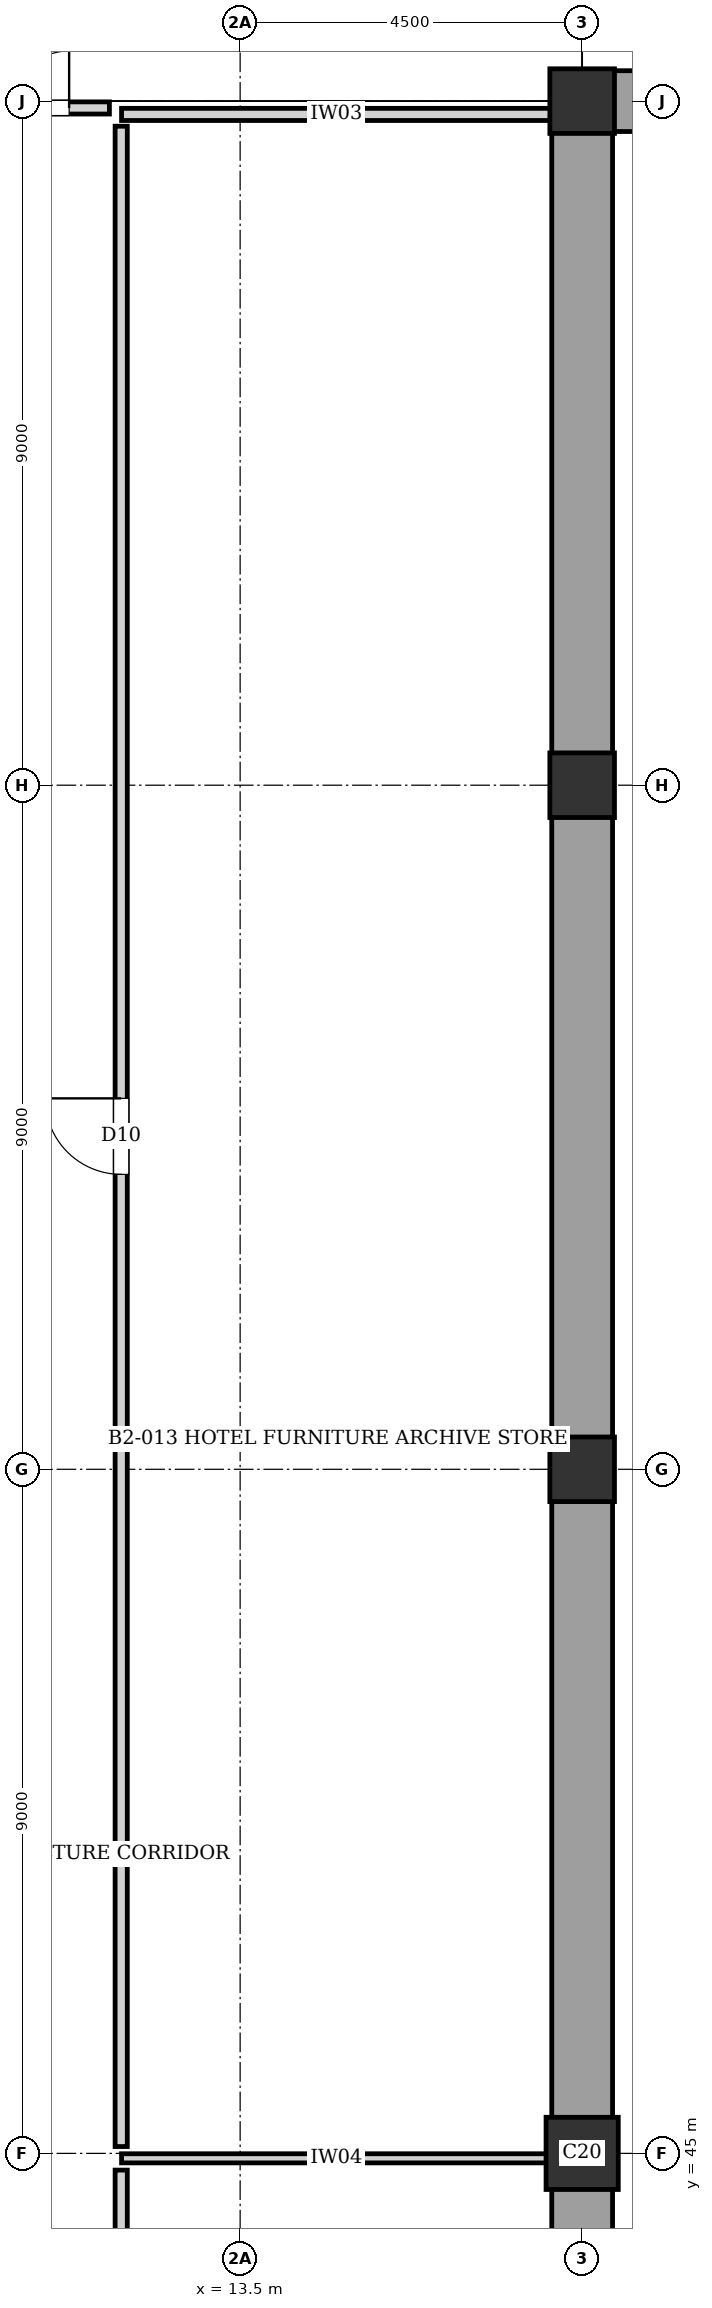
"""IFC4 building model, lengths in metres.
Left out: names, types, materials, properties, quantities, classifications, styles, units other than length and angle.
Written with IfcOpenShell. Run it as: python <this file> out.ifc"""

import sys

from ifc_helpers import new_model, si_unit, direction, frame, frame_2d, origin, origin_2d, place, context, subcontext, project, spatial, rectangle, extrude, element, fill, save


model = new_model("IFC4")
c1 = context("Model", 3, precision=1e-05, world=origin(), true_north=direction((0.0, 1.0)))
c2 = subcontext(c1, "Body", "Model", "MODEL_VIEW")
j1 = project(units=[si_unit("LENGTHUNIT", "METRE"), si_unit("PLANEANGLEUNIT", "RADIAN")], contexts=[c1])
p1 = place(None, origin())
s1 = spatial("IfcSite", under=j1, at=p1, CompositionType="ELEMENT")
p2 = place(p1, origin())
s2 = spatial("IfcBuilding", under=s1, at=p2, CompositionType="ELEMENT")
p3 = place(p2, frame((0.0, 0.0, -8.96)))
s3 = spatial("IfcBuildingStorey", under=s2, at=p3, CompositionType="ELEMENT", Elevation=-8.96)
p4 = place(p3, frame((18.0, 45.0, 0.0), z_axis=(0.0, 0.0, 1.0), x_axis=(1.0, 0.0, 0.0)))
e1 = element("IfcColumn", 1, at=p4, inside=s3, PredefinedType="COLUMN", context=c2, shape_type="SweptSolid", body=[
    extrude(rectangle(XDim=0.95, YDim=0.95, at=origin_2d()), origin(), (0.0, 0.0, 1.0), 4.48),
])
for number, where, z_axis, x_axis in (
    (2, (18.0, 54.0, 0.0), (0.0, 0.0, 1.0), (1.0, 0.0, 0.0)),
    (3, (18.0, 63.0, 0.0), (0.0, 0.0, 1.0), (1.0, 0.0, 0.0)),
    (4, (18.0, 72.0, 0.0), (0.0, 0.0, 1.0), (1.0, 0.0, 0.0)),
):
    element("IfcColumn", number, at=place(p3, frame(where, z_axis=z_axis, x_axis=x_axis)), inside=s3, PredefinedType="COLUMN", context=c2, shape_type="SweptSolid", body=[
        extrude(rectangle(XDim=0.85, YDim=0.85, at=origin_2d()), origin(), (0.0, 0.0, 1.0), 4.48),
    ])
for number, where, z_axis, x_axis in (
    (5, (18.0, 72.0, 0.0), (0.0, 0.0, 1.0), (0.0, -1.0, 0.0)),
    (6, (18.0, 63.0, 0.0), (0.0, 0.0, 1.0), (0.0, -1.0, 0.0)),
    (7, (18.0, 54.0, 0.0), (0.0, 0.0, 1.0), (0.0, -1.0, 0.0)),
    (8, (18.0, 45.0, 0.0), (0.0, 0.0, 1.0), (0.0, -1.0, 0.0)),
):
    element("IfcWall", number, at=place(p3, frame(where, z_axis=z_axis, x_axis=x_axis)), inside=s3, PredefinedType="USERDEFINED", context=c2, shape_type="SweptSolid", body=[
        extrude(rectangle(XDim=9.0, YDim=0.8, at=frame_2d((4.5, 0.0))), origin(), (0.0, 0.0, 1.0), 4.2),
    ])
p5 = place(p3, frame((27.0, 72.0, 0.0), z_axis=(0.0, 0.0, 1.0), x_axis=(-1.0, 0.0, 0.0)))
e9 = element("IfcWall", 9, at=p5, inside=s3, PredefinedType="USERDEFINED", context=c2, shape_type="SweptSolid", body=[
    extrude(rectangle(XDim=9.0, YDim=0.8, at=frame_2d((4.5, 0.0))), origin(), (0.0, 0.0, 1.0), 4.03),
])
p6 = place(p3, frame((11.94, 44.935, 0.0), z_axis=(0.0, 0.0, 1.0), x_axis=(1.0, 0.0, 0.0)))
e10 = element("IfcWall", 10, at=p6, inside=s3, PredefinedType="PARTITIONING", context=c2, shape_type="SweptSolid", body=[
    extrude(rectangle(XDim=5.655, YDim=0.12, at=frame_2d((2.828, 0.0))), origin(), (0.0, 0.0, 1.0), 3.3),
])
p7 = place(p3, frame((11.94, 71.825, 0.0), z_axis=(0.0, 0.0, 1.0), x_axis=(1.0, 0.0, 0.0)))
e11 = element("IfcWall", 11, at=p7, inside=s3, PredefinedType="PARTITIONING", context=c2, shape_type="SweptSolid", body=[
    extrude(rectangle(XDim=5.655, YDim=0.16, at=frame_2d((2.828, 0.0))), origin(), (0.0, 0.0, 1.0), 3.3),
])
p8 = place(p3, frame((11.935, 22.59, 0.0), z_axis=(0.0, 0.0, 1.0), x_axis=(0.0, 1.0, 0.0)))
e12 = element("IfcWall", 12, at=p8, inside=s3, PredefinedType="PARTITIONING", context=c2, shape_type="SweptSolid", body=[
    extrude(rectangle(XDim=22.19, YDim=0.16, at=frame_2d((11.095, 0.0))), origin(), (0.0, 0.0, 1.0), 4.2),
])
p9 = place(p8, frame((7.932, 0.0, 0.0)))
e13 = element("IfcOpeningElement", 13, at=p9, cuts=e12, PredefinedType="OPENING", context=c2, shape_type="SweptSolid", body=[
    extrude(rectangle(XDim=1.0, YDim=2.1, at=frame_2d((0.5, 1.05))), frame((0.0, 0.09, 0.0), z_axis=(0.0, -1.0, 0.0), x_axis=(1.0, 0.0, 0.0)), (0.0, 0.0, 1.0), 0.18),
])
p10 = place(p3, frame((11.935, 45.09, 0.0), z_axis=(0.0, 0.0, 1.0), x_axis=(0.0, 1.0, 0.0)))
e14 = element("IfcWall", 14, at=p10, inside=s3, PredefinedType="PARTITIONING", context=c2, shape_type="SweptSolid", body=[
    extrude(rectangle(XDim=26.58, YDim=0.16, at=frame_2d((13.29, 0.0))), origin(), (0.0, 0.0, 1.0), 4.2),
])
p11 = place(p10, frame((12.79, 0.0, 0.0)))
e15 = element("IfcOpeningElement", 15, at=p11, cuts=e14, PredefinedType="OPENING", context=c2, shape_type="SweptSolid", body=[
    extrude(rectangle(XDim=1.0, YDim=2.1, at=frame_2d((0.5, 1.05))), frame((0.0, 0.09, 0.0), z_axis=(0.0, -1.0, 0.0), x_axis=(1.0, 0.0, 0.0)), (0.0, 0.0, 1.0), 0.18),
])
p12 = place(p3, frame((9.22, 71.91, 0.0), z_axis=(0.0, 0.0, 1.0), x_axis=(1.0, 0.0, 0.0)))
e16 = element("IfcWall", 16, at=p12, inside=s3, PredefinedType="PARTITIONING", context=c2, shape_type="SweptSolid", body=[
    extrude(rectangle(XDim=2.56, YDim=0.16, at=frame_2d((1.28, 0.0))), origin(), (0.0, 0.0, 1.0), 3.3),
])
p13 = place(p12, frame((0.53, 0.0, 0.0)))
e17 = element("IfcOpeningElement", 17, at=p13, cuts=e16, PredefinedType="OPENING", context=c2, shape_type="SweptSolid", body=[
    extrude(rectangle(XDim=1.5, YDim=2.1, at=frame_2d((0.75, 1.05))), frame((0.0, 0.09, 0.0), z_axis=(0.0, -1.0, 0.0), x_axis=(1.0, 0.0, 0.0)), (0.0, 0.0, 1.0), 0.18),
])
p14 = place(p11, origin())
e18 = element("IfcDoor", 18, at=p14, inside=s3, OperationType="SINGLE_SWING_RIGHT", PredefinedType="DOOR", context=c2, shape_type="SweptSolid", body=[
    extrude(rectangle(XDim=1.0, YDim=2.1, at=frame_2d((0.5, 1.05))), frame((0.0, 0.025, 0.0), z_axis=(0.0, -1.0, 0.0), x_axis=(1.0, 0.0, 0.0)), (0.0, 0.0, 1.0), 0.05),
])
fill(e15, e18)
p15 = place(p13, origin())
e19 = element("IfcDoor", 19, at=p15, inside=s3, OperationType="DOUBLE_DOOR_SINGLE_SWING", PredefinedType="DOOR", context=c2, shape_type="SweptSolid", body=[
    extrude(rectangle(XDim=1.5, YDim=2.1, at=frame_2d((0.75, 1.05))), frame((0.0, 0.025, 0.0), z_axis=(0.0, -1.0, 0.0), x_axis=(1.0, 0.0, 0.0)), (0.0, 0.0, 1.0), 0.05),
])
fill(e17, e19)
save(model, sys.argv[1])
